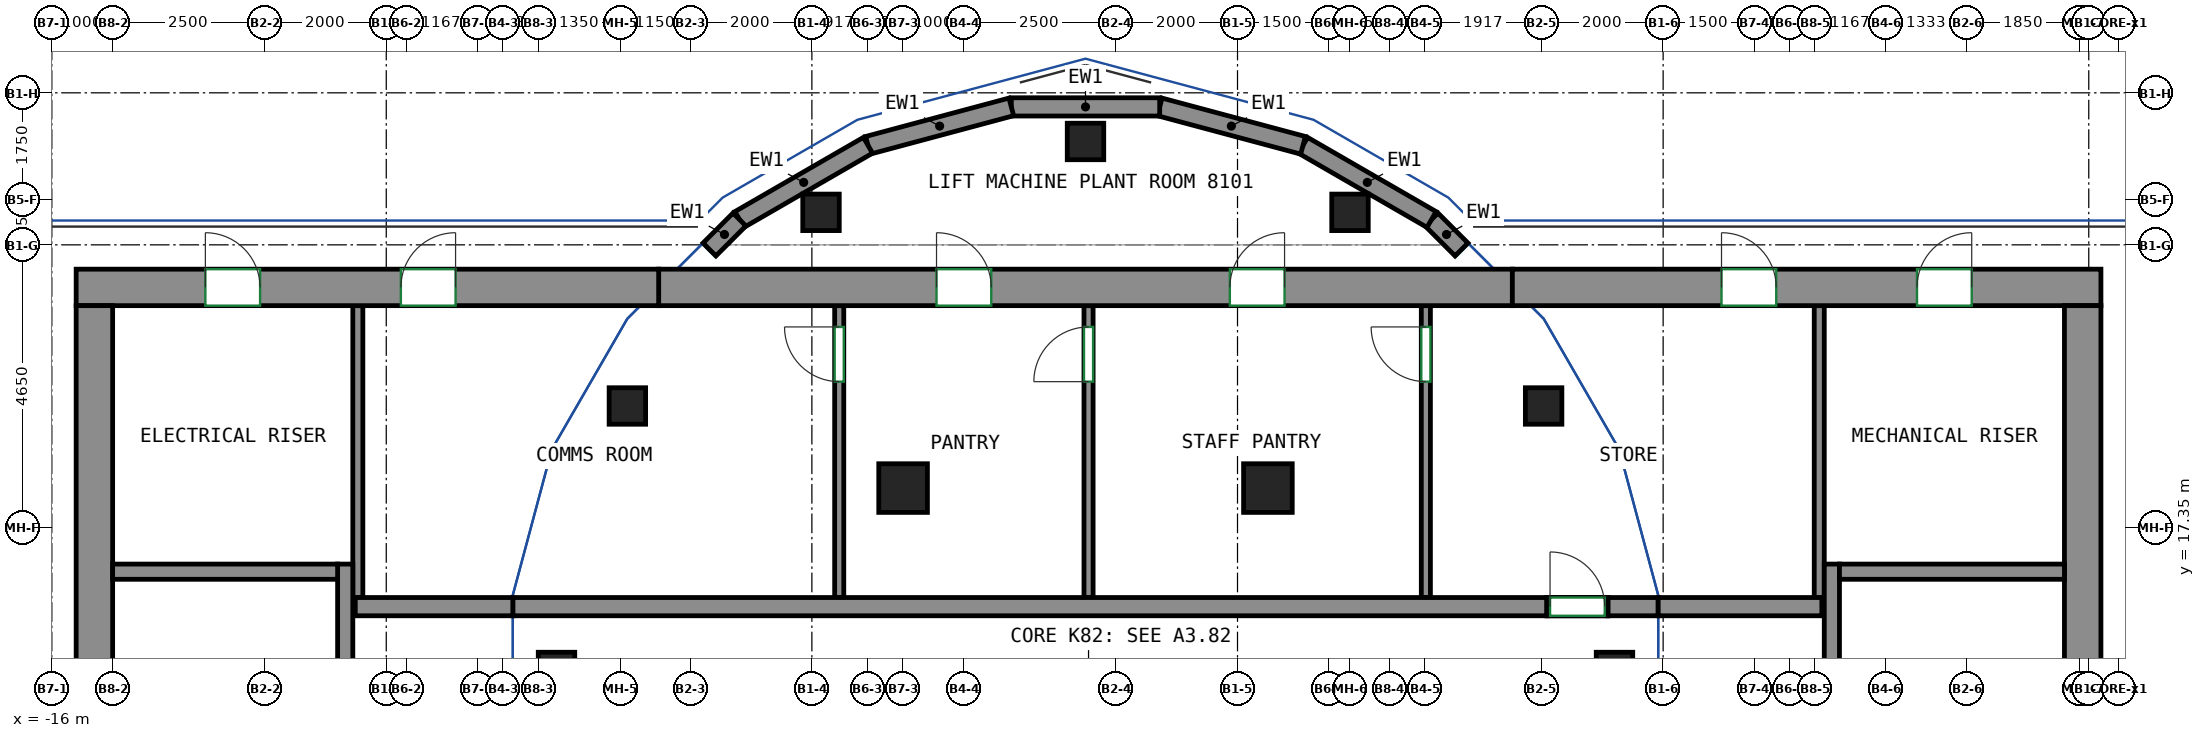
"""IFC4 building model, lengths in metres.
Left out: names, types, materials, properties, quantities, classifications, styles, units other than length and angle.
Written with IfcOpenShell. Run it as: python <this file> out.ifc"""

import sys

from ifc_helpers import new_model, si_unit, direction, frame, frame_2d, origin, origin_2d, place, context, subcontext, project, spatial, rectangle, extrude, source, transform, mapped, element, fill, save


model = new_model("IFC4")
c1 = context("Model", 3, precision=1e-05, world=origin(), true_north=direction((0.0, 1.0)))
c2 = subcontext(c1, "Body", "Model", "MODEL_VIEW")
j1 = project(units=[si_unit("LENGTHUNIT", "METRE"), si_unit("PLANEANGLEUNIT", "RADIAN")], contexts=[c1])
p1 = place(None, origin())
s1 = spatial("IfcSite", under=j1, at=p1, CompositionType="ELEMENT")
p2 = place(p1, origin())
s2 = spatial("IfcBuilding", under=s1, at=p2, CompositionType="ELEMENT")
p3 = place(p2, frame((0.0, 0.0, 323.8)))
s3 = spatial("IfcBuildingStorey", under=s2, at=p3, CompositionType="ELEMENT", Elevation=323.8)
m1 = source(origin(), c2, "Body", "SweptSolid", [
    extrude(rectangle(XDim=0.6, YDim=0.6, at=origin_2d()), origin(), (0.0, 0.0, 1.0), 4.6),
])
for number, where, z_axis, x_axis in (
    (1, (9.7, 15.0, 0.0), (0.0, 0.0, 1.0), (1.0, 0.0, 0.0)),
    (2, (8.534, 19.35, 0.0), (0.0, 0.0, 1.0), (1.0, 0.0, 0.0)),
    (3, (5.35, 22.534, 0.0), (0.0, 0.0, 1.0), (1.0, 0.0, 0.0)),
    (4, (1.0, 23.7, 0.0), (0.0, 0.0, 1.0), (1.0, 0.0, 0.0)),
    (5, (-3.35, 22.534, 0.0), (0.0, 0.0, 1.0), (1.0, 0.0, 0.0)),
    (6, (-6.534, 19.35, 0.0), (0.0, 0.0, 1.0), (1.0, 0.0, 0.0)),
    (7, (-7.7, 15.0, 0.0), (0.0, 0.0, 1.0), (1.0, 0.0, 0.0)),
):
    element("IfcColumn", number, at=place(p3, frame(where, z_axis=z_axis, x_axis=x_axis)), inside=s3, PredefinedType="COLUMN", context=c2, shape_type="MappedRepresentation", body=[
        mapped(m1, transform((0.0, 0.0, 0.0))),
    ])
m2 = source(origin(), c2, "Body", "SweptSolid", [
    extrude(rectangle(XDim=0.8, YDim=0.8, at=origin_2d()), origin(), (0.0, 0.0, 1.0), 4.6),
])
for number, where, z_axis, x_axis in (
    (8, (-2.0, 18.0, 0.0), (0.0, 0.0, 1.0), (1.0, 0.0, 0.0)),
    (9, (4.0, 18.0, 0.0), (0.0, 0.0, 1.0), (1.0, 0.0, 0.0)),
):
    element("IfcColumn", number, at=place(p3, frame(where, z_axis=z_axis, x_axis=x_axis)), inside=s3, PredefinedType="COLUMN", context=c2, shape_type="MappedRepresentation", body=[
        mapped(m2, transform((0.0, 0.0, 0.0))),
    ])
m3 = source(origin(), c2, "Body", "SweptSolid", [
    extrude(rectangle(XDim=14.04, YDim=0.6, at=frame_2d((7.02, 0.0))), origin(), (0.0, 0.0, 1.0), 4.6),
])
p4 = place(p3, frame((-6.02, 21.3, 0.0), z_axis=(0.0, 0.0, 1.0), x_axis=(1.0, 0.0, 0.0)))
e10 = element("IfcWall", 10, at=p4, inside=s3, PredefinedType="SHEAR", context=c2, shape_type="MappedRepresentation", body=[
    mapped(m3, transform((0.0, 0.0, 0.0))),
])
p5 = place(p4, frame((4.57, 0.0, 0.0)))
e11 = element("IfcOpeningElement", 11, at=p5, cuts=e10, PredefinedType="OPENING", context=c2, shape_type="SweptSolid", body=[
    extrude(rectangle(XDim=0.9, YDim=2.1, at=frame_2d((0.45, 1.05))), frame((0.0, 0.31, 0.0), z_axis=(0.0, -1.0, 0.0), x_axis=(1.0, 0.0, 0.0)), (0.0, 0.0, 1.0), 0.62),
])
p6 = place(p4, frame((9.394, 0.0, 0.0)))
e12 = element("IfcOpeningElement", 12, at=p6, cuts=e10, PredefinedType="OPENING", context=c2, shape_type="SweptSolid", body=[
    extrude(rectangle(XDim=0.9, YDim=2.1, at=frame_2d((0.45, 1.05))), frame((0.0, 0.31, 0.0), z_axis=(0.0, -1.0, 0.0), x_axis=(1.0, 0.0, 0.0)), (0.0, 0.0, 1.0), 0.62),
])
m4 = source(origin(), c2, "Body", "SweptSolid", [
    extrude(rectangle(XDim=9.58, YDim=0.6, at=frame_2d((4.79, 0.0))), origin(), (0.0, 0.0, 1.0), 5.0),
])
p7 = place(p3, frame((-15.6, 21.3, -0.4), z_axis=(0.0, 0.0, 1.0), x_axis=(1.0, 0.0, 0.0)))
e13 = element("IfcWall", 13, at=p7, inside=s3, PredefinedType="SHEAR", context=c2, shape_type="MappedRepresentation", body=[
    mapped(m4, transform((0.0, 0.0, 0.0))),
])
p8 = place(p7, frame((5.34, 0.0, 0.4)))
e14 = element("IfcOpeningElement", 14, at=p8, cuts=e13, PredefinedType="OPENING", context=c2, shape_type="SweptSolid", body=[
    extrude(rectangle(XDim=0.9, YDim=2.1, at=frame_2d((0.45, 1.05))), frame((0.0, 0.31, 0.0), z_axis=(0.0, -1.0, 0.0), x_axis=(1.0, 0.0, 0.0)), (0.0, 0.0, 1.0), 0.62),
])
p9 = place(p7, frame((2.125, 0.0, 0.4)))
e15 = element("IfcOpeningElement", 15, at=p9, cuts=e13, PredefinedType="OPENING", context=c2, shape_type="SweptSolid", body=[
    extrude(rectangle(XDim=0.9, YDim=2.1, at=frame_2d((0.45, 1.05))), frame((0.0, 0.31, 0.0), z_axis=(0.0, -1.0, 0.0), x_axis=(1.0, 0.0, 0.0)), (0.0, 0.0, 1.0), 0.62),
])
m5 = source(origin(), c2, "Body", "SweptSolid", [
    extrude(rectangle(XDim=9.68, YDim=0.6, at=frame_2d((4.84, 0.0))), origin(), (0.0, 0.0, 1.0), 5.0),
])
p10 = place(p3, frame((8.02, 21.3, -0.4), z_axis=(0.0, 0.0, 1.0), x_axis=(1.0, 0.0, 0.0)))
e16 = element("IfcWall", 16, at=p10, inside=s3, PredefinedType="SHEAR", context=c2, shape_type="MappedRepresentation", body=[
    mapped(m5, transform((0.0, 0.0, 0.0))),
])
p11 = place(p10, frame((3.44, 0.0, 0.4)))
e17 = element("IfcOpeningElement", 17, at=p11, cuts=e16, PredefinedType="OPENING", context=c2, shape_type="SweptSolid", body=[
    extrude(rectangle(XDim=0.9, YDim=2.1, at=frame_2d((0.45, 1.05))), frame((0.0, 0.31, 0.0), z_axis=(0.0, -1.0, 0.0), x_axis=(1.0, 0.0, 0.0)), (0.0, 0.0, 1.0), 0.62),
])
p12 = place(p10, frame((6.655, 0.0, 0.4)))
e18 = element("IfcOpeningElement", 18, at=p12, cuts=e16, PredefinedType="OPENING", context=c2, shape_type="SweptSolid", body=[
    extrude(rectangle(XDim=0.9, YDim=2.1, at=frame_2d((0.45, 1.05))), frame((0.0, 0.31, 0.0), z_axis=(0.0, -1.0, 0.0), x_axis=(1.0, 0.0, 0.0)), (0.0, 0.0, 1.0), 0.62),
])
m6 = source(origin(), c2, "Body", "SweptSolid", [
    extrude(rectangle(XDim=12.0, YDim=0.6, at=frame_2d((6.0, 0.0))), origin(), (0.0, 0.0, 1.0), 5.0),
])
for number, where, z_axis, x_axis in (
    (19, (-15.3, 9.0, -0.4), (0.0, 0.0, 1.0), (0.0, 1.0, 0.0)),
    (20, (17.4, 9.0, -0.4), (0.0, 0.0, 1.0), (0.0, 1.0, 0.0)),
):
    element("IfcWall", number, at=place(p3, frame(where, z_axis=z_axis, x_axis=x_axis)), inside=s3, PredefinedType="SHEAR", context=c2, shape_type="MappedRepresentation", body=[
        mapped(m6, transform((0.0, 0.0, 0.0))),
    ])
m7 = source(origin(), c2, "Body", "SweptSolid", [
    extrude(rectangle(XDim=7.75, YDim=0.25, at=frame_2d((3.875, 0.0))), origin(), (0.0, 0.0, 1.0), 5.0),
])
p13 = place(p3, frame((-11.175, 9.0, -0.4), z_axis=(0.0, 0.0, 1.0), x_axis=(0.0, 1.0, 0.0)))
e21 = element("IfcWall", 21, at=p13, inside=s3, PredefinedType="SHEAR", context=c2, shape_type="MappedRepresentation", body=[
    mapped(m7, transform((0.0, 0.0, 0.0))),
])
m8 = source(origin(), c2, "Body", "SweptSolid", [
    extrude(rectangle(XDim=3.7, YDim=0.25, at=frame_2d((1.85, 0.0))), origin(), (0.0, 0.0, 1.0), 5.0),
])
p14 = place(p3, frame((-15.0, 16.625, -0.4), z_axis=(0.0, 0.0, 1.0), x_axis=(1.0, 0.0, 0.0)))
e22 = element("IfcWall", 22, at=p14, inside=s3, PredefinedType="SHEAR", context=c2, shape_type="MappedRepresentation", body=[
    mapped(m8, transform((0.0, 0.0, 0.0))),
])
p15 = place(p3, frame((13.275, 9.0, -0.4), z_axis=(0.0, 0.0, 1.0), x_axis=(0.0, 1.0, 0.0)))
e23 = element("IfcWall", 23, at=p15, inside=s3, PredefinedType="SHEAR", context=c2, shape_type="MappedRepresentation", body=[
    mapped(m7, transform((0.0, 0.0, 0.0))),
])
m9 = source(origin(), c2, "Body", "SweptSolid", [
    extrude(rectangle(XDim=3.7, YDim=0.25, at=frame_2d((1.85, 0.0))), origin(), (0.0, 0.0, 1.0), 5.0),
])
p16 = place(p3, frame((13.4, 16.625, -0.4), z_axis=(0.0, 0.0, 1.0), x_axis=(1.0, 0.0, 0.0)))
e24 = element("IfcWall", 24, at=p16, inside=s3, PredefinedType="SHEAR", context=c2, shape_type="MappedRepresentation", body=[
    mapped(m9, transform((0.0, 0.0, 0.0))),
])
m10 = source(origin(), c2, "Body", "SweptSolid", [
    extrude(rectangle(XDim=17.009, YDim=0.3, at=frame_2d((8.504, 0.0))), origin(), (0.0, 0.0, 1.0), 4.6),
])
p17 = place(p3, frame((-8.419, 16.05, 0.0), z_axis=(0.0, 0.0, 1.0), x_axis=(1.0, 0.0, 0.0)))
e25 = element("IfcWall", 25, at=p17, inside=s3, PredefinedType="SHEAR", context=c2, shape_type="MappedRepresentation", body=[
    mapped(m10, transform((0.0, 0.0, 0.0))),
])
m11 = source(origin(), c2, "Body", "SweptSolid", [
    extrude(rectangle(XDim=2.591, YDim=0.3, at=frame_2d((1.296, 0.0))), origin(), (0.0, 0.0, 1.0), 5.0),
])
p18 = place(p3, frame((-11.01, 16.05, -0.4), z_axis=(0.0, 0.0, 1.0), x_axis=(1.0, 0.0, 0.0)))
e26 = element("IfcWall", 26, at=p18, inside=s3, PredefinedType="SHEAR", context=c2, shape_type="MappedRepresentation", body=[
    mapped(m11, transform((0.0, 0.0, 0.0))),
])
m12 = source(origin(), c2, "Body", "SweptSolid", [
    extrude(rectangle(XDim=0.829, YDim=0.3, at=frame_2d((0.414, 0.0))), origin(), (0.0, 0.0, 1.0), 4.6),
])
p19 = place(p3, frame((9.59, 16.05, 0.0), z_axis=(0.0, 0.0, 1.0), x_axis=(1.0, 0.0, 0.0)))
e27 = element("IfcWall", 27, at=p19, inside=s3, PredefinedType="SHEAR", context=c2, shape_type="MappedRepresentation", body=[
    mapped(m12, transform((0.0, 0.0, 0.0))),
])
m13 = source(origin(), c2, "Body", "SweptSolid", [
    extrude(rectangle(XDim=2.691, YDim=0.3, at=frame_2d((1.346, 0.0))), origin(), (0.0, 0.0, 1.0), 5.0),
])
p20 = place(p3, frame((10.419, 16.05, -0.4), z_axis=(0.0, 0.0, 1.0), x_axis=(1.0, 0.0, 0.0)))
e28 = element("IfcWall", 28, at=p20, inside=s3, PredefinedType="SHEAR", context=c2, shape_type="MappedRepresentation", body=[
    mapped(m13, transform((0.0, 0.0, 0.0))),
])
m14 = source(origin(), c2, "Body", "SweptSolid", [
    extrude(rectangle(XDim=1.0, YDim=0.3, at=frame_2d((0.5, 0.0))), origin(), (0.0, 0.0, 1.0), 1.35),
])
p21 = place(p3, frame((8.59, 16.05, 3.25), z_axis=(0.0, 0.0, 1.0), x_axis=(1.0, 0.0, 0.0)))
e29 = element("IfcWall", 29, at=p21, inside=s3, PredefinedType="SHEAR", context=c2, shape_type="MappedRepresentation", body=[
    mapped(m14, transform((0.0, 0.0, 0.0))),
])
m15 = source(origin(), c2, "Body", "SweptSolid", [
    extrude(rectangle(XDim=0.697, YDim=0.3, at=frame_2d((0.349, 0.0))), origin(), (0.0, 0.0, 1.0), 1.2),
])
p22 = place(p3, frame((7.184, 21.924, 0.0), z_axis=(0.0, 0.0, 1.0), x_axis=(-0.706931689754, 0.707281829274, 0.0)))
e30 = element("IfcWall", 30, at=p22, inside=s3, PredefinedType="SOLIDWALL", context=c2, shape_type="MappedRepresentation", body=[
    mapped(m15, transform((0.0, 0.0, 0.0))),
])
m16 = source(origin(), c2, "Body", "SweptSolid", [
    extrude(rectangle(XDim=2.44, YDim=0.3, at=frame_2d((1.22, 0.0))), origin(), (0.0, 0.0, 1.0), 1.2),
])
p23 = place(p3, frame((6.691, 22.417, 0.0), z_axis=(0.0, 0.0, 1.0), x_axis=(-0.866030657337, 0.49999090047, 0.0)))
e31 = element("IfcWall", 31, at=p23, inside=s3, PredefinedType="SOLIDWALL", context=c2, shape_type="MappedRepresentation", body=[
    mapped(m16, transform((0.0, 0.0, 0.0))),
])
m17 = source(origin(), c2, "Body", "SweptSolid", [
    extrude(rectangle(XDim=2.441, YDim=0.3, at=frame_2d((1.22, 0.0))), origin(), (0.0, 0.0, 1.0), 1.2),
])
p24 = place(p3, frame((4.578, 23.637, 0.0), z_axis=(0.0, 0.0, 1.0), x_axis=(-0.96593376363, 0.258789420724, 0.0)))
e32 = element("IfcWall", 32, at=p24, inside=s3, PredefinedType="SOLIDWALL", context=c2, shape_type="MappedRepresentation", body=[
    mapped(m17, transform((0.0, 0.0, 0.0))),
])
p25 = place(p3, frame((2.22, 24.269, 0.0), z_axis=(0.0, 0.0, 1.0), x_axis=(-1.0, 0.0, 0.0)))
e33 = element("IfcWall", 33, at=p25, inside=s3, PredefinedType="SOLIDWALL", context=c2, shape_type="MappedRepresentation", body=[
    mapped(m16, transform((0.0, 0.0, 0.0))),
])
p26 = place(p3, frame((-0.22, 24.269, 0.0), z_axis=(0.0, 0.0, 1.0), x_axis=(-0.96593376363, -0.258789420724, 0.0)))
e34 = element("IfcWall", 34, at=p26, inside=s3, PredefinedType="SOLIDWALL", context=c2, shape_type="MappedRepresentation", body=[
    mapped(m17, transform((0.0, 0.0, 0.0))),
])
p27 = place(p3, frame((-2.578, 23.637, 0.0), z_axis=(0.0, 0.0, 1.0), x_axis=(-0.866030657337, -0.49999090047, 0.0)))
e35 = element("IfcWall", 35, at=p27, inside=s3, PredefinedType="SOLIDWALL", context=c2, shape_type="MappedRepresentation", body=[
    mapped(m16, transform((0.0, 0.0, 0.0))),
])
p28 = place(p3, frame((-4.691, 22.417, 0.0), z_axis=(0.0, 0.0, 1.0), x_axis=(-0.706931689754, -0.707281829274, 0.0)))
e36 = element("IfcWall", 36, at=p28, inside=s3, PredefinedType="SOLIDWALL", context=c2, shape_type="MappedRepresentation", body=[
    mapped(m15, transform((0.0, 0.0, 0.0))),
])
m18 = source(origin(), c2, "Body", "SweptSolid", [
    extrude(rectangle(XDim=4.8, YDim=0.165, at=frame_2d((2.4, 0.0))), origin(), (0.0, 0.0, 1.0), 4.6),
])
for number, where, z_axis, x_axis in (
    (37, (13.067, 16.2, 0.0), (0.0, 0.0, 1.0), (0.0, 1.0, 0.0)),
    (38, (-10.968, 16.2, 0.0), (0.0, 0.0, 1.0), (0.0, 1.0, 0.0)),
):
    element("IfcWall", number, at=place(p3, frame(where, z_axis=z_axis, x_axis=x_axis)), inside=s3, PredefinedType="PARTITIONING", context=c2, shape_type="MappedRepresentation", body=[
        mapped(m18, transform((0.0, 0.0, 0.0))),
    ])
m19 = source(origin(), c2, "Body", "SweptSolid", [
    extrude(rectangle(XDim=4.8, YDim=0.15, at=frame_2d((2.4, 0.0))), origin(), (0.0, 0.0, 1.0), 4.6),
])
p29 = place(p3, frame((-3.05, 16.2, 0.0), z_axis=(0.0, 0.0, 1.0), x_axis=(0.0, 1.0, 0.0)))
e39 = element("IfcWall", 39, at=p29, inside=s3, PredefinedType="PARTITIONING", context=c2, shape_type="MappedRepresentation", body=[
    mapped(m19, transform((0.0, 0.0, 0.0))),
])
p30 = place(p29, frame((3.55, 0.0, 0.0)))
e40 = element("IfcOpeningElement", 40, at=p30, cuts=e39, PredefinedType="OPENING", context=c2, shape_type="SweptSolid", body=[
    extrude(rectangle(XDim=0.9, YDim=2.1, at=frame_2d((0.45, 1.05))), frame((0.0, 0.085, 0.0), z_axis=(0.0, -1.0, 0.0), x_axis=(1.0, 0.0, 0.0)), (0.0, 0.0, 1.0), 0.17),
])
p31 = place(p3, frame((1.05, 16.2, 0.0), z_axis=(0.0, 0.0, 1.0), x_axis=(0.0, 1.0, 0.0)))
e41 = element("IfcWall", 41, at=p31, inside=s3, PredefinedType="PARTITIONING", context=c2, shape_type="MappedRepresentation", body=[
    mapped(m19, transform((0.0, 0.0, 0.0))),
])
p32 = place(p31, frame((3.55, 0.0, 0.0)))
e42 = element("IfcOpeningElement", 42, at=p32, cuts=e41, PredefinedType="OPENING", context=c2, shape_type="SweptSolid", body=[
    extrude(rectangle(XDim=0.9, YDim=2.1, at=frame_2d((0.45, 1.05))), frame((0.0, 0.085, 0.0), z_axis=(0.0, -1.0, 0.0), x_axis=(1.0, 0.0, 0.0)), (0.0, 0.0, 1.0), 0.17),
])
p33 = place(p3, frame((6.598, 16.2, 0.0), z_axis=(0.0, 0.0, 1.0), x_axis=(0.0, 1.0, 0.0)))
e43 = element("IfcWall", 43, at=p33, inside=s3, PredefinedType="PARTITIONING", context=c2, shape_type="MappedRepresentation", body=[
    mapped(m19, transform((0.0, 0.0, 0.0))),
])
p34 = place(p33, frame((3.55, 0.0, 0.0)))
e44 = element("IfcOpeningElement", 44, at=p34, cuts=e43, PredefinedType="OPENING", context=c2, shape_type="SweptSolid", body=[
    extrude(rectangle(XDim=0.9, YDim=2.1, at=frame_2d((0.45, 1.05))), frame((0.0, 0.085, 0.0), z_axis=(0.0, -1.0, 0.0), x_axis=(1.0, 0.0, 0.0)), (0.0, 0.0, 1.0), 0.17),
])
m20 = source(origin(), c2, "Body", "SweptSolid", [
    extrude(rectangle(XDim=1.0, YDim=0.3, at=frame_2d((0.5, 0.0))), origin(), (0.0, 0.0, 1.0), 2.4),
])
p35 = place(p3, frame((8.59, 16.05, 0.0), z_axis=(0.0, 0.0, 1.0), x_axis=(1.0, 0.0, 0.0)))
e45 = element("IfcWall", 45, at=p35, inside=s3, PredefinedType="PARTITIONING", context=c2, shape_type="MappedRepresentation", body=[
    mapped(m20, transform((0.0, 0.0, 0.0))),
])
p36 = place(p35, frame((0.05, 0.0, 0.0)))
e46 = element("IfcOpeningElement", 46, at=p36, cuts=e45, PredefinedType="OPENING", context=c2, shape_type="SweptSolid", body=[
    extrude(rectangle(XDim=0.9, YDim=2.1, at=frame_2d((0.45, 1.05))), frame((0.0, 0.16, 0.0), z_axis=(0.0, -1.0, 0.0), x_axis=(1.0, 0.0, 0.0)), (0.0, 0.0, 1.0), 0.32),
])
p37 = place(p8, origin())
e47 = element("IfcDoor", 47, at=p37, inside=s3, OperationType="SINGLE_SWING_RIGHT", PredefinedType="DOOR", context=c2, shape_type="SweptSolid", body=[
    extrude(rectangle(XDim=0.9, YDim=2.1, at=frame_2d((0.45, 1.05))), frame((0.0, -0.155, 0.0), z_axis=(0.0, -1.0, 0.0), x_axis=(1.0, 0.0, 0.0)), (0.0, 0.0, 1.0), 0.05),
])
fill(e14, e47)
p38 = place(p5, origin())
e48 = element("IfcDoor", 48, at=p38, inside=s3, OperationType="SINGLE_SWING_LEFT", PredefinedType="DOOR", context=c2, shape_type="SweptSolid", body=[
    extrude(rectangle(XDim=0.9, YDim=2.1, at=frame_2d((0.45, 1.05))), frame((0.0, -0.155, 0.0), z_axis=(0.0, -1.0, 0.0), x_axis=(1.0, 0.0, 0.0)), (0.0, 0.0, 1.0), 0.05),
])
fill(e11, e48)
p39 = place(p6, origin())
e49 = element("IfcDoor", 49, at=p39, inside=s3, OperationType="SINGLE_SWING_RIGHT", PredefinedType="DOOR", context=c2, shape_type="SweptSolid", body=[
    extrude(rectangle(XDim=0.9, YDim=2.1, at=frame_2d((0.45, 1.05))), frame((0.0, -0.155, 0.0), z_axis=(0.0, -1.0, 0.0), x_axis=(1.0, 0.0, 0.0)), (0.0, 0.0, 1.0), 0.05),
])
fill(e12, e49)
p40 = place(p11, origin())
e50 = element("IfcDoor", 50, at=p40, inside=s3, OperationType="SINGLE_SWING_LEFT", PredefinedType="DOOR", context=c2, shape_type="SweptSolid", body=[
    extrude(rectangle(XDim=0.9, YDim=2.1, at=frame_2d((0.45, 1.05))), frame((0.0, -0.155, 0.0), z_axis=(0.0, -1.0, 0.0), x_axis=(1.0, 0.0, 0.0)), (0.0, 0.0, 1.0), 0.05),
])
fill(e17, e50)
p41 = place(p30, origin())
e51 = element("IfcDoor", 51, at=p41, inside=s3, OperationType="SINGLE_SWING_RIGHT", PredefinedType="DOOR", context=c2, shape_type="SweptSolid", body=[
    extrude(rectangle(XDim=0.9, YDim=2.1, at=frame_2d((0.45, 1.05))), frame((0.0, 0.025, 0.0), z_axis=(0.0, -1.0, 0.0), x_axis=(1.0, 0.0, 0.0)), (0.0, 0.0, 1.0), 0.05),
])
fill(e40, e51)
p42 = place(p32, origin())
e52 = element("IfcDoor", 52, at=p42, inside=s3, OperationType="SINGLE_SWING_LEFT", PredefinedType="DOOR", context=c2, shape_type="SweptSolid", body=[
    extrude(rectangle(XDim=0.9, YDim=2.1, at=frame_2d((0.45, 1.05))), frame((0.0, 0.025, 0.0), z_axis=(0.0, -1.0, 0.0), x_axis=(1.0, 0.0, 0.0)), (0.0, 0.0, 1.0), 0.05),
])
fill(e42, e52)
p43 = place(p34, origin())
e53 = element("IfcDoor", 53, at=p43, inside=s3, OperationType="SINGLE_SWING_RIGHT", PredefinedType="DOOR", context=c2, shape_type="SweptSolid", body=[
    extrude(rectangle(XDim=0.9, YDim=2.1, at=frame_2d((0.45, 1.05))), frame((0.0, 0.025, 0.0), z_axis=(0.0, -1.0, 0.0), x_axis=(1.0, 0.0, 0.0)), (0.0, 0.0, 1.0), 0.05),
])
fill(e44, e53)
p44 = place(p9, origin())
e54 = element("IfcDoor", 54, at=p44, inside=s3, OperationType="SINGLE_SWING_LEFT", PredefinedType="DOOR", context=c2, shape_type="SweptSolid", body=[
    extrude(rectangle(XDim=0.9, YDim=2.1, at=frame_2d((0.45, 1.05))), frame((0.0, -0.155, 0.0), z_axis=(0.0, -1.0, 0.0), x_axis=(1.0, 0.0, 0.0)), (0.0, 0.0, 1.0), 0.05),
])
fill(e15, e54)
p45 = place(p12, origin())
e55 = element("IfcDoor", 55, at=p45, inside=s3, OperationType="SINGLE_SWING_RIGHT", PredefinedType="DOOR", context=c2, shape_type="SweptSolid", body=[
    extrude(rectangle(XDim=0.9, YDim=2.1, at=frame_2d((0.45, 1.05))), frame((0.0, -0.155, 0.0), z_axis=(0.0, -1.0, 0.0), x_axis=(1.0, 0.0, 0.0)), (0.0, 0.0, 1.0), 0.05),
])
fill(e18, e55)
p46 = place(p36, origin())
e56 = element("IfcDoor", 56, at=p46, inside=s3, OperationType="SINGLE_SWING_LEFT", PredefinedType="DOOR", context=c2, shape_type="SweptSolid", body=[
    extrude(rectangle(XDim=0.9, YDim=2.1, at=frame_2d((0.45, 1.05))), frame((0.0, 0.025, 0.0), z_axis=(0.0, -1.0, 0.0), x_axis=(1.0, 0.0, 0.0)), (0.0, 0.0, 1.0), 0.05),
])
fill(e46, e56)
save(model, sys.argv[1])
